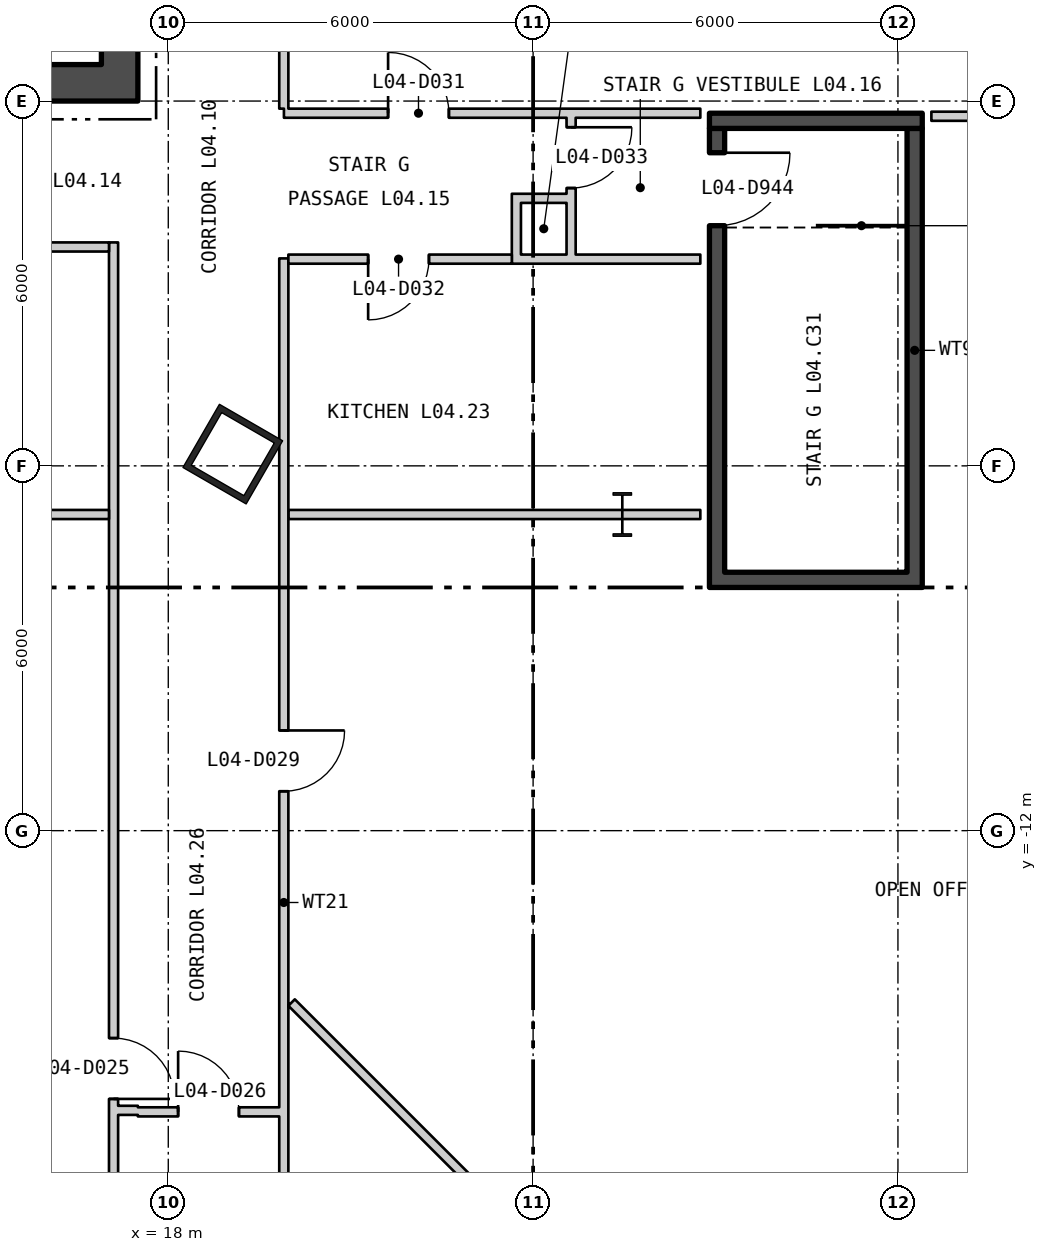
"""IFC4 building model, lengths in metres.
Left out: names, types, materials, properties, quantities, classifications, styles, units other than length and angle.
Written with IfcOpenShell. Run it as: python <this file> out.ifc"""

import sys

from ifc_helpers import new_model, si_unit, direction, frame, frame_2d, origin, origin_2d, place, context, subcontext, project, spatial, rectangle, hollow_rectangle, i_section, extrude, element, fill, save


model = new_model("IFC4")
c1 = context("Model", 3, precision=1e-05, world=origin(), true_north=direction((0.0, 1.0)))
c2 = subcontext(c1, "Body", "Model", "MODEL_VIEW")
j1 = project(units=[si_unit("LENGTHUNIT", "METRE"), si_unit("PLANEANGLEUNIT", "RADIAN")], contexts=[c1])
p1 = place(None, origin())
s1 = spatial("IfcSite", under=j1, at=p1, CompositionType="ELEMENT")
p2 = place(p1, origin())
s2 = spatial("IfcBuilding", under=s1, at=p2, CompositionType="ELEMENT")
p3 = place(p2, frame((0.0, 0.0, 23.7)))
s3 = spatial("IfcBuildingStorey", under=s2, at=p3, CompositionType="ELEMENT", Elevation=23.7)
p4 = place(p3, frame((19.061, -5.807, 0.0), z_axis=(0.0, 0.0, 1.0), x_axis=(0.5, 0.866025403784, 0.0)))
e1 = element("IfcColumn", 1, at=p4, inside=s3, PredefinedType="COLUMN", context=c2, shape_type="SweptSolid", body=[
    extrude(hollow_rectangle(XDim=1.2, YDim=1.2, WallThickness=0.1, at=origin_2d()), origin(), (0.0, 0.0, 1.0), 5.1),
])
p5 = place(p3, frame((25.467, -6.8, 0.0), z_axis=(0.0, 0.0, 1.0), x_axis=(1.0, 0.0, 0.0)))
e2 = element("IfcColumn", 2, at=p5, inside=s3, PredefinedType="COLUMN", context=c2, shape_type="SweptSolid", body=[
    extrude(i_section(OverallWidth=0.304, OverallDepth=0.716, WebThickness=0.021, FlangeThickness=0.04, at=origin_2d()), origin(), (0.0, 0.0, 1.0), 4.85),
])
p6 = place(p3, frame((-17.5, 0.3, 0.0), z_axis=(0.0, 0.0, 1.0), x_axis=(1.0, 0.0, 0.0)))
e3 = element("IfcWall", 3, at=p6, inside=s3, PredefinedType="SHEAR", context=c2, shape_type="SweptSolid", body=[
    extrude(rectangle(XDim=35.0, YDim=0.6, at=frame_2d((17.5, 0.0))), origin(), (0.0, 0.0, 1.0), 4.85),
])
p7 = place(p6, frame((12.0, 0.0, 0.0)))
e4 = element("IfcOpeningElement", 4, at=p7, cuts=e3, PredefinedType="OPENING", context=c2, shape_type="SweptSolid", body=[
    extrude(rectangle(XDim=1.8, YDim=2.4, at=frame_2d((0.9, 1.2))), frame((0.0, 0.31, 0.0), z_axis=(0.0, -1.0, 0.0), x_axis=(1.0, 0.0, 0.0)), (0.0, 0.0, 1.0), 0.62),
])
p8 = place(p6, frame((22.0, 0.0, 0.0)))
e5 = element("IfcOpeningElement", 5, at=p8, cuts=e3, PredefinedType="OPENING", context=c2, shape_type="SweptSolid", body=[
    extrude(rectangle(XDim=1.8, YDim=2.4, at=frame_2d((0.9, 1.2))), frame((0.0, 0.31, 0.0), z_axis=(0.0, -1.0, 0.0), x_axis=(1.0, 0.0, 0.0)), (0.0, 0.0, 1.0), 0.62),
])
p9 = place(p3, frame((17.2, 0.6, 0.0), z_axis=(0.0, 0.0, 1.0), x_axis=(0.0, 1.0, 0.0)))
e6 = element("IfcWall", 6, at=p9, inside=s3, PredefinedType="SHEAR", context=c2, shape_type="SweptSolid", body=[
    extrude(rectangle(XDim=16.8, YDim=0.6, at=frame_2d((8.4, 0.0))), origin(), (0.0, 0.0, 1.0), 4.85),
])
p10 = place(p9, frame((5.7, 0.0, 0.0)))
e7 = element("IfcOpeningElement", 7, at=p10, cuts=e6, PredefinedType="OPENING", context=c2, shape_type="SweptSolid", body=[
    extrude(rectangle(XDim=1.5, YDim=2.1, at=frame_2d((0.75, 1.05))), frame((0.0, 0.31, 0.0), z_axis=(0.0, -1.0, 0.0), x_axis=(1.0, 0.0, 0.0)), (0.0, 0.0, 1.0), 0.62),
])
p11 = place(p9, frame((1.488, 0.0, 0.0)))
e8 = element("IfcOpeningElement", 8, at=p11, cuts=e6, PredefinedType="OPENING", context=c2, shape_type="SweptSolid", body=[
    extrude(rectangle(XDim=0.9, YDim=2.1, at=frame_2d((0.45, 1.05))), frame((0.0, 0.31, 0.0), z_axis=(0.0, -1.0, 0.0), x_axis=(1.0, 0.0, 0.0)), (0.0, 0.0, 1.0), 0.62),
])
p12 = place(p9, frame((4.338, 0.0, 0.0)))
e9 = element("IfcOpeningElement", 9, at=p12, cuts=e6, PredefinedType="OPENING", context=c2, shape_type="SweptSolid", body=[
    extrude(rectangle(XDim=0.9, YDim=2.1, at=frame_2d((0.45, 1.05))), frame((0.0, 0.31, 0.0), z_axis=(0.0, -1.0, 0.0), x_axis=(1.0, 0.0, 0.0)), (0.0, 0.0, 1.0), 0.62),
])
p13 = place(p9, frame((10.483, 0.0, 0.0)))
e10 = element("IfcOpeningElement", 10, at=p13, cuts=e6, PredefinedType="OPENING", context=c2, shape_type="SweptSolid", body=[
    extrude(rectangle(XDim=0.9, YDim=2.1, at=frame_2d((0.45, 1.05))), frame((0.0, 0.31, 0.0), z_axis=(0.0, -1.0, 0.0), x_axis=(1.0, 0.0, 0.0)), (0.0, 0.0, 1.0), 0.62),
])
p14 = place(p9, frame((15.233, 0.0, 0.0)))
e11 = element("IfcOpeningElement", 11, at=p14, cuts=e6, PredefinedType="OPENING", context=c2, shape_type="SweptSolid", body=[
    extrude(rectangle(XDim=1.0, YDim=2.1, at=frame_2d((0.5, 1.05))), frame((0.0, 0.31, 0.0), z_axis=(0.0, -1.0, 0.0), x_axis=(1.0, 0.0, 0.0)), (0.0, 0.0, 1.0), 0.62),
])
p15 = place(p3, frame((27.025, -7.75, 0.0), z_axis=(0.0, 0.0, 1.0), x_axis=(0.0, 1.0, 0.0)))
e12 = element("IfcWall", 12, at=p15, inside=s3, PredefinedType="SHEAR", context=c2, shape_type="SweptSolid", body=[
    extrude(rectangle(XDim=7.3, YDim=0.25, at=frame_2d((3.65, 0.0))), origin(), (0.0, 0.0, 1.0), 4.85),
])
p16 = place(p15, frame((5.7, 0.0, 0.0)))
e13 = element("IfcOpeningElement", 13, at=p16, cuts=e12, PredefinedType="OPENING", context=c2, shape_type="SweptSolid", body=[
    extrude(rectangle(XDim=1.2, YDim=2.1, at=frame_2d((0.6, 1.05))), frame((0.0, 0.135, 0.0), z_axis=(0.0, -1.0, 0.0), x_axis=(1.0, 0.0, 0.0)), (0.0, 0.0, 1.0), 0.27),
])
p17 = place(p3, frame((30.275, -7.75, 0.0), z_axis=(0.0, 0.0, 1.0), x_axis=(0.0, 1.0, 0.0)))
e14 = element("IfcWall", 14, at=p17, inside=s3, PredefinedType="SHEAR", context=c2, shape_type="SweptSolid", body=[
    extrude(rectangle(XDim=7.3, YDim=0.25, at=frame_2d((3.65, 0.0))), origin(), (0.0, 0.0, 1.0), 4.85),
])
for number, where, z_axis, x_axis in (
    (15, (26.9, -7.875, 0.0), (0.0, 0.0, 1.0), (1.0, 0.0, 0.0)),
    (16, (26.9, -0.325, 0.0), (0.0, 0.0, 1.0), (1.0, 0.0, 0.0)),
):
    element("IfcWall", number, at=place(p3, frame(where, z_axis=z_axis, x_axis=x_axis)), inside=s3, PredefinedType="SHEAR", context=c2, shape_type="SweptSolid", body=[
        extrude(rectangle(XDim=3.5, YDim=0.25, at=frame_2d((1.75, 0.0))), origin(), (0.0, 0.0, 1.0), 4.85),
    ])
p18 = place(p3, frame((9.075, -6.8, 0.0), z_axis=(0.0, 0.0, 1.0), x_axis=(1.0, 0.0, 0.0)))
e17 = element("IfcWall", 17, at=p18, inside=s3, PredefinedType="PARTITIONING", context=c2, shape_type="SweptSolid", body=[
    extrude(rectangle(XDim=7.95, YDim=0.15, at=frame_2d((3.975, 0.0))), origin(), (0.0, 0.0, 1.0), 4.85),
])
p19 = place(p3, frame((9.075, -2.4, 0.0), z_axis=(0.0, 0.0, 1.0), x_axis=(1.0, 0.0, 0.0)))
e18 = element("IfcWall", 18, at=p19, inside=s3, PredefinedType="PARTITIONING", context=c2, shape_type="SweptSolid", body=[
    extrude(rectangle(XDim=7.95, YDim=0.15, at=frame_2d((3.975, 0.0))), origin(), (0.0, 0.0, 1.0), 4.85),
])
p20 = place(p19, frame((1.329, 0.0, 0.0)))
e19 = element("IfcOpeningElement", 19, at=p20, cuts=e18, PredefinedType="OPENING", context=c2, shape_type="SweptSolid", body=[
    extrude(rectangle(XDim=1.0, YDim=2.1, at=frame_2d((0.5, 1.05))), frame((0.0, 0.085, 0.0), z_axis=(0.0, -1.0, 0.0), x_axis=(1.0, 0.0, 0.0)), (0.0, 0.0, 1.0), 0.17),
])
p21 = place(p19, frame((5.279, 0.0, 0.0)))
e20 = element("IfcOpeningElement", 20, at=p21, cuts=e18, PredefinedType="OPENING", context=c2, shape_type="SweptSolid", body=[
    extrude(rectangle(XDim=1.0, YDim=2.1, at=frame_2d((0.5, 1.05))), frame((0.0, 0.085, 0.0), z_axis=(0.0, -1.0, 0.0), x_axis=(1.0, 0.0, 0.0)), (0.0, 0.0, 1.0), 0.17),
])
p22 = place(p3, frame((17.1, -21.375, 0.0), z_axis=(0.0, 0.0, 1.0), x_axis=(0.0, 1.0, 0.0)))
e21 = element("IfcWall", 21, at=p22, inside=s3, PredefinedType="PARTITIONING", context=c2, shape_type="SweptSolid", body=[
    extrude(rectangle(XDim=19.05, YDim=0.15, at=frame_2d((9.525, 0.0))), origin(), (0.0, 0.0, 1.0), 4.85),
])
p23 = place(p22, frame((4.963, 0.0, 0.0)))
e22 = element("IfcOpeningElement", 22, at=p23, cuts=e21, PredefinedType="OPENING", context=c2, shape_type="SweptSolid", body=[
    extrude(rectangle(XDim=1.0, YDim=2.1, at=frame_2d((0.5, 1.05))), frame((0.0, 0.085, 0.0), z_axis=(0.0, -1.0, 0.0), x_axis=(1.0, 0.0, 0.0)), (0.0, 0.0, 1.0), 0.17),
])
p24 = place(p3, frame((17.175, -16.6, 0.0), z_axis=(0.0, 0.0, 1.0), x_axis=(1.0, 0.0, 0.0)))
e23 = element("IfcWall", 23, at=p24, inside=s3, PredefinedType="PARTITIONING", context=c2, shape_type="SweptSolid", body=[
    extrude(rectangle(XDim=0.325, YDim=0.15, at=frame_2d((0.163, 0.0))), origin(), (0.0, 0.0, 1.0), 4.85),
])
p25 = place(p3, frame((17.5, -16.625, 0.0), z_axis=(0.0, 0.0, 1.0), x_axis=(1.0, 0.0, 0.0)))
e24 = element("IfcWall", 24, at=p25, inside=s3, PredefinedType="PARTITIONING", context=c2, shape_type="SweptSolid", body=[
    extrude(rectangle(XDim=2.325, YDim=0.15, at=frame_2d((1.163, 0.0))), origin(), (0.0, 0.0, 1.0), 4.85),
])
p26 = place(p25, frame((0.662, 0.0, 0.0)))
e25 = element("IfcOpeningElement", 25, at=p26, cuts=e24, PredefinedType="OPENING", context=c2, shape_type="SweptSolid", body=[
    extrude(rectangle(XDim=1.0, YDim=2.1, at=frame_2d((0.5, 1.05))), frame((0.0, 0.085, 0.0), z_axis=(0.0, -1.0, 0.0), x_axis=(1.0, 0.0, 0.0)), (0.0, 0.0, 1.0), 0.17),
])
p27 = place(p3, frame((19.9, -23.775, 0.0), z_axis=(0.0, 0.0, 1.0), x_axis=(0.0, 1.0, 0.0)))
e26 = element("IfcWall", 26, at=p27, inside=s3, PredefinedType="PARTITIONING", context=c2, shape_type="SweptSolid", body=[
    extrude(rectangle(XDim=21.187, YDim=0.15, at=frame_2d((10.594, 0.0))), origin(), (0.0, 0.0, 1.0), 4.85),
])
p28 = place(p27, frame((3.017, 0.0, 0.0)))
e27 = element("IfcOpeningElement", 27, at=p28, cuts=e26, PredefinedType="OPENING", context=c2, shape_type="SweptSolid", body=[
    extrude(rectangle(XDim=1.0, YDim=2.1, at=frame_2d((0.5, 1.05))), frame((0.0, 0.085, 0.0), z_axis=(0.0, -1.0, 0.0), x_axis=(1.0, 0.0, 0.0)), (0.0, 0.0, 1.0), 0.17),
])
p29 = place(p27, frame((12.423, 0.0, 0.0)))
e28 = element("IfcOpeningElement", 28, at=p29, cuts=e26, PredefinedType="OPENING", context=c2, shape_type="SweptSolid", body=[
    extrude(rectangle(XDim=1.0, YDim=2.1, at=frame_2d((0.5, 1.05))), frame((0.0, 0.085, 0.0), z_axis=(0.0, -1.0, 0.0), x_axis=(1.0, 0.0, 0.0)), (0.0, 0.0, 1.0), 0.17),
])
p30 = place(p3, frame((19.9, -0.125, 0.0), z_axis=(0.0, 0.0, 1.0), x_axis=(0.0, 1.0, 0.0)))
e29 = element("IfcWall", 29, at=p30, inside=s3, PredefinedType="PARTITIONING", context=c2, shape_type="SweptSolid", body=[
    extrude(rectangle(XDim=1.15, YDim=0.15, at=frame_2d((0.575, 0.0))), origin(), (0.0, 0.0, 1.0), 4.85),
])
p31 = place(p3, frame((19.902, -0.2, 0.0), z_axis=(0.0, 0.0, 1.0), x_axis=(1.0, 0.0, 0.0)))
e30 = element("IfcWall", 30, at=p31, inside=s3, PredefinedType="PARTITIONING", context=c2, shape_type="SweptSolid", body=[
    extrude(rectangle(XDim=6.848, YDim=0.15, at=frame_2d((3.424, 0.0))), origin(), (0.0, 0.0, 1.0), 4.85),
])
p32 = place(p31, frame((1.713, 0.0, 0.0)))
e31 = element("IfcOpeningElement", 31, at=p32, cuts=e30, PredefinedType="OPENING", context=c2, shape_type="SweptSolid", body=[
    extrude(rectangle(XDim=1.0, YDim=2.1, at=frame_2d((0.5, 1.05))), frame((0.0, 0.085, 0.0), z_axis=(0.0, -1.0, 0.0), x_axis=(1.0, 0.0, 0.0)), (0.0, 0.0, 1.0), 0.17),
])
p33 = place(p3, frame((19.975, -6.8, 0.0), z_axis=(0.0, 0.0, 1.0), x_axis=(1.0, 0.0, 0.0)))
e32 = element("IfcWall", 32, at=p33, inside=s3, PredefinedType="PARTITIONING", context=c2, shape_type="SweptSolid", body=[
    extrude(rectangle(XDim=5.492, YDim=0.15, at=frame_2d((2.746, 0.0))), origin(), (0.0, 0.0, 1.0), 4.16),
])
p34 = place(p3, frame((25.467, -6.8, 0.0), z_axis=(0.0, 0.0, 1.0), x_axis=(1.0, 0.0, 0.0)))
e33 = element("IfcWall", 33, at=p34, inside=s3, PredefinedType="PARTITIONING", context=c2, shape_type="SweptSolid", body=[
    extrude(rectangle(XDim=1.283, YDim=0.15, at=frame_2d((0.641, 0.0))), origin(), (0.0, 0.0, 1.0), 4.06),
])
p35 = place(p3, frame((19.975, -2.6, 0.0), z_axis=(0.0, 0.0, 1.0), x_axis=(1.0, 0.0, 0.0)))
e34 = element("IfcWall", 34, at=p35, inside=s3, PredefinedType="PARTITIONING", context=c2, shape_type="SweptSolid", body=[
    extrude(rectangle(XDim=3.675, YDim=0.15, at=frame_2d((1.837, 0.0))), origin(), (0.0, 0.0, 1.0), 4.85),
])
p36 = place(p35, frame((1.312, 0.0, 0.0)))
e35 = element("IfcOpeningElement", 35, at=p36, cuts=e34, PredefinedType="OPENING", context=c2, shape_type="SweptSolid", body=[
    extrude(rectangle(XDim=1.0, YDim=2.1, at=frame_2d((0.5, 1.05))), frame((0.0, 0.085, 0.0), z_axis=(0.0, -1.0, 0.0), x_axis=(1.0, 0.0, 0.0)), (0.0, 0.0, 1.0), 0.17),
])
p37 = place(p3, frame((20.028, -14.827, 0.0), z_axis=(0.0, 0.0, 1.0), x_axis=(0.707106781187, -0.707106781187, 0.0)))
e36 = element("IfcWall", 36, at=p37, inside=s3, PredefinedType="PARTITIONING", context=c2, shape_type="SweptSolid", body=[
    extrude(rectangle(XDim=7.068, YDim=0.15, at=frame_2d((3.534, 0.0))), origin(), (0.0, 0.0, 1.0), 4.85),
])
p38 = place(p3, frame((23.725, -2.675, 0.0), z_axis=(0.0, 0.0, 1.0), x_axis=(0.0, 1.0, 0.0)))
e37 = element("IfcWall", 37, at=p38, inside=s3, PredefinedType="PARTITIONING", context=c2, shape_type="SweptSolid", body=[
    extrude(rectangle(XDim=1.15, YDim=0.15, at=frame_2d((0.575, 0.0))), origin(), (0.0, 0.0, 1.0), 4.85),
])
for number, where, z_axis, x_axis in (
    (38, (23.8, -2.6, 0.0), (0.0, 0.0, 1.0), (1.0, 0.0, 0.0)),
    (39, (23.8, -1.6, 0.0), (0.0, 0.0, 1.0), (1.0, 0.0, 0.0)),
):
    element("IfcWall", number, at=place(p3, frame(where, z_axis=z_axis, x_axis=x_axis)), inside=s3, PredefinedType="PARTITIONING", context=c2, shape_type="SweptSolid", body=[
        extrude(rectangle(XDim=0.75, YDim=0.15, at=frame_2d((0.375, 0.0))), origin(), (0.0, 0.0, 1.0), 4.85),
    ])
p39 = place(p3, frame((24.625, -2.675, 0.0), z_axis=(0.0, 0.0, 1.0), x_axis=(0.0, 1.0, 0.0)))
e40 = element("IfcWall", 40, at=p39, inside=s3, PredefinedType="PARTITIONING", context=c2, shape_type="SweptSolid", body=[
    extrude(rectangle(XDim=1.087, YDim=0.15, at=frame_2d((0.543, 0.0))), origin(), (0.0, 0.0, 1.0), 4.85),
])
p40 = place(p3, frame((24.625, -1.588, 0.0), z_axis=(0.0, 0.0, 1.0), x_axis=(0.0, 1.0, 0.0)))
e41 = element("IfcWall", 41, at=p40, inside=s3, PredefinedType="PARTITIONING", context=c2, shape_type="SweptSolid", body=[
    extrude(rectangle(XDim=1.313, YDim=0.15, at=frame_2d((0.656, 0.0))), origin(), (0.0, 0.0, 1.0), 4.85),
])
p41 = place(p40, frame((0.157, 0.0, 0.0)))
e42 = element("IfcOpeningElement", 42, at=p41, cuts=e41, PredefinedType="OPENING", context=c2, shape_type="SweptSolid", body=[
    extrude(rectangle(XDim=1.0, YDim=2.1, at=frame_2d((0.5, 1.05))), frame((0.0, 0.085, 0.0), z_axis=(0.0, -1.0, 0.0), x_axis=(1.0, 0.0, 0.0)), (0.0, 0.0, 1.0), 0.17),
])
p42 = place(p3, frame((24.7, -2.6, 0.0), z_axis=(0.0, 0.0, 1.0), x_axis=(1.0, 0.0, 0.0)))
e43 = element("IfcWall", 43, at=p42, inside=s3, PredefinedType="PARTITIONING", context=c2, shape_type="SweptSolid", body=[
    extrude(rectangle(XDim=2.05, YDim=0.15, at=frame_2d((1.025, 0.0))), origin(), (0.0, 0.0, 1.0), 4.85),
])
p43 = place(p3, frame((30.55, -0.25, 0.0), z_axis=(0.0, 0.0, 1.0), x_axis=(1.0, 0.0, 0.0)))
e44 = element("IfcWall", 44, at=p43, inside=s3, PredefinedType="PARTITIONING", context=c2, shape_type="SweptSolid", body=[
    extrude(rectangle(XDim=7.55, YDim=0.15, at=frame_2d((3.775, 0.0))), origin(), (0.0, 0.0, 1.0), 4.85),
])
p44 = place(p16, origin())
e45 = element("IfcDoor", 45, at=p44, inside=s3, OperationType="SINGLE_SWING_RIGHT", PredefinedType="DOOR", context=c2, shape_type="SweptSolid", body=[
    extrude(rectangle(XDim=1.2, YDim=2.1, at=frame_2d((0.6, 1.05))), frame((0.0, 0.025, 0.0), z_axis=(0.0, -1.0, 0.0), x_axis=(1.0, 0.0, 0.0)), (0.0, 0.0, 1.0), 0.05),
])
fill(e13, e45)
p45 = place(p23, origin())
e46 = element("IfcDoor", 46, at=p45, inside=s3, OperationType="SINGLE_SWING_LEFT", PredefinedType="DOOR", context=c2, shape_type="SweptSolid", body=[
    extrude(rectangle(XDim=1.0, YDim=2.1, at=frame_2d((0.5, 1.05))), frame((0.0, 0.025, 0.0), z_axis=(0.0, -1.0, 0.0), x_axis=(1.0, 0.0, 0.0)), (0.0, 0.0, 1.0), 0.05),
])
fill(e22, e46)
p46 = place(p26, origin())
e47 = element("IfcDoor", 47, at=p46, inside=s3, OperationType="SINGLE_SWING_RIGHT", PredefinedType="DOOR", context=c2, shape_type="SweptSolid", body=[
    extrude(rectangle(XDim=1.0, YDim=2.1, at=frame_2d((0.5, 1.05))), frame((0.0, 0.025, 0.0), z_axis=(0.0, -1.0, 0.0), x_axis=(1.0, 0.0, 0.0)), (0.0, 0.0, 1.0), 0.05),
])
fill(e25, e47)
p47 = place(p29, origin())
e48 = element("IfcDoor", 48, at=p47, inside=s3, OperationType="SINGLE_SWING_RIGHT", PredefinedType="DOOR", context=c2, shape_type="SweptSolid", body=[
    extrude(rectangle(XDim=1.0, YDim=2.1, at=frame_2d((0.5, 1.05))), frame((0.0, 0.025, 0.0), z_axis=(0.0, -1.0, 0.0), x_axis=(1.0, 0.0, 0.0)), (0.0, 0.0, 1.0), 0.05),
])
fill(e28, e48)
p48 = place(p32, origin())
e49 = element("IfcDoor", 49, at=p48, inside=s3, OperationType="SINGLE_SWING_RIGHT", PredefinedType="DOOR", context=c2, shape_type="SweptSolid", body=[
    extrude(rectangle(XDim=1.0, YDim=2.1, at=frame_2d((0.5, 1.05))), frame((0.0, 0.025, 0.0), z_axis=(0.0, -1.0, 0.0), x_axis=(1.0, 0.0, 0.0)), (0.0, 0.0, 1.0), 0.05),
])
fill(e31, e49)
p49 = place(p36, origin())
e50 = element("IfcDoor", 50, at=p49, inside=s3, OperationType="SINGLE_SWING_LEFT", PredefinedType="DOOR", context=c2, shape_type="SweptSolid", body=[
    extrude(rectangle(XDim=1.0, YDim=2.1, at=frame_2d((0.5, 1.05))), frame((0.0, 0.025, 0.0), z_axis=(0.0, -1.0, 0.0), x_axis=(1.0, 0.0, 0.0)), (0.0, 0.0, 1.0), 0.05),
])
fill(e35, e50)
p50 = place(p41, origin())
e51 = element("IfcDoor", 51, at=p50, inside=s3, OperationType="SINGLE_SWING_RIGHT", PredefinedType="DOOR", context=c2, shape_type="SweptSolid", body=[
    extrude(rectangle(XDim=1.0, YDim=2.1, at=frame_2d((0.5, 1.05))), frame((0.0, 0.025, 0.0), z_axis=(0.0, -1.0, 0.0), x_axis=(1.0, 0.0, 0.0)), (0.0, 0.0, 1.0), 0.05),
])
fill(e42, e51)
save(model, sys.argv[1])
